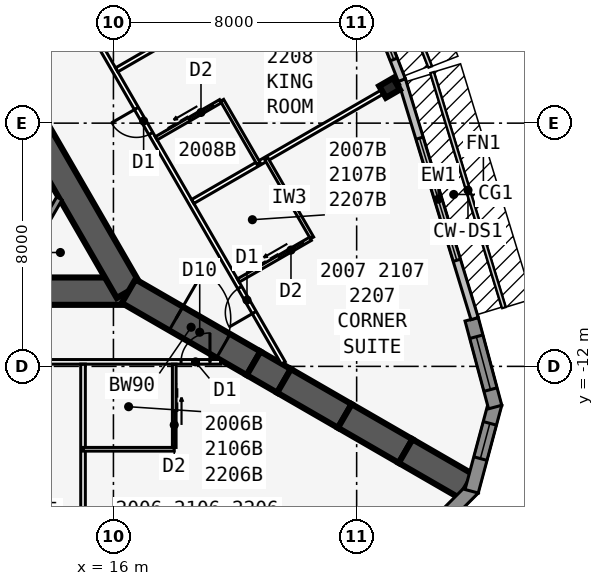
"""IFC4 building model, lengths in metres.
Left out: names, types, materials, properties, quantities, classifications, styles, units other than length and angle.
Written with IfcOpenShell. Run it as: python <this file> out.ifc"""

import sys

from ifc_helpers import new_model, si_unit, direction, frame, frame_2d, origin, origin_2d, place, context, subcontext, project, spatial, polyline, rectangle, i_section, outline, extrude, element, fill, save


model = new_model("IFC4")
c1 = context("Model", 3, precision=1e-05, world=origin(), true_north=direction((0.0, 1.0)))
c2 = subcontext(c1, "Body", "Model", "MODEL_VIEW")
j1 = project(units=[si_unit("LENGTHUNIT", "METRE"), si_unit("PLANEANGLEUNIT", "RADIAN")], contexts=[c1])
p1 = place(None, origin())
s1 = spatial("IfcSite", under=j1, at=p1, CompositionType="ELEMENT")
p2 = place(p1, origin())
s2 = spatial("IfcBuilding", under=s1, at=p2, CompositionType="ELEMENT")
p3 = place(p2, frame((0.0, 0.0, 79.5)))
s3 = spatial("IfcBuildingStorey", under=s2, at=p3, CompositionType="ELEMENT", Elevation=79.5)
p4 = place(p3, frame((-16.5, -9.526, 0.0), z_axis=(0.0, 0.0, 1.0), x_axis=(1.0, 0.0, 0.0)))
e1 = element("IfcWall", 1, at=p4, inside=s3, PredefinedType="SHEAR", context=c2, shape_type="SweptSolid", body=[
    extrude(rectangle(XDim=33.0, YDim=0.9, at=frame_2d((16.5, 0.0))), origin(), (0.0, 0.0, 1.0), 3.4),
])
p5 = place(p4, frame((14.05, 0.0, 0.0)))
e2 = element("IfcOpeningElement", 2, at=p5, cuts=e1, PredefinedType="OPENING", context=c2, shape_type="SweptSolid", body=[
    extrude(rectangle(XDim=1.8, YDim=2.13, at=frame_2d((0.9, 1.065))), frame((0.0, 0.46, 0.0), z_axis=(0.0, -1.0, 0.0), x_axis=(1.0, 0.0, 0.0)), (0.0, 0.0, 1.0), 0.92),
])
p6 = place(p3, frame((16.5, -9.526, 0.0), z_axis=(0.0, 0.0, 1.0), x_axis=(-0.499999749417, 0.866025548458, 0.0)))
e3 = element("IfcWall", 3, at=p6, inside=s3, PredefinedType="SHEAR", context=c2, shape_type="SweptSolid", body=[
    extrude(rectangle(XDim=33.0, YDim=0.9, at=frame_2d((16.5, 0.0))), origin(), (0.0, 0.0, 1.0), 3.4),
])
p7 = place(p6, frame((14.15, 0.0, 0.0)))
e4 = element("IfcOpeningElement", 4, at=p7, cuts=e3, PredefinedType="OPENING", context=c2, shape_type="SweptSolid", body=[
    extrude(rectangle(XDim=1.8, YDim=2.13, at=frame_2d((0.9, 1.065))), frame((0.0, 0.46, 0.0), z_axis=(0.0, -1.0, 0.0), x_axis=(1.0, 0.0, 0.0)), (0.0, 0.0, 1.0), 0.92),
])
p8 = place(p6, frame((12.6, 0.0, 0.0)))
e5 = element("IfcOpeningElement", 5, at=p8, cuts=e3, PredefinedType="OPENING", context=c2, shape_type="SweptSolid", body=[
    extrude(rectangle(XDim=1.0, YDim=2.13, at=frame_2d((0.5, 1.065))), frame((0.0, 0.46, 0.0), z_axis=(0.0, -1.0, 0.0), x_axis=(1.0, 0.0, 0.0)), (0.0, 0.0, 1.0), 0.92),
])
p9 = place(p3, frame((16.5, -9.526, 0.0), z_axis=(0.0, 0.0, 1.0), x_axis=(0.866031398331, -0.499989616998, 0.0)))
e6 = element("IfcWall", 6, at=p9, inside=s3, PredefinedType="SHEAR", context=c2, shape_type="SweptSolid", body=[
    extrude(rectangle(XDim=4.746, YDim=0.9, at=frame_2d((2.373, 0.0))), origin(), (0.0, 0.0, 1.0), 3.4),
])
p10 = place(p9, frame((1.8, 0.0, 0.0)))
e7 = element("IfcOpeningElement", 7, at=p10, cuts=e6, PredefinedType="OPENING", context=c2, shape_type="SweptSolid", body=[
    extrude(rectangle(XDim=1.8, YDim=2.13, at=frame_2d((0.9, 1.065))), frame((0.0, 0.46, 0.0), z_axis=(0.0, -1.0, 0.0), x_axis=(1.0, 0.0, 0.0)), (0.0, 0.0, 1.0), 0.92),
])
p11 = place(p3, frame((20.61, -11.899, 0.0), z_axis=(0.0, 0.0, 1.0), x_axis=(0.866009537788, -0.500027479704, 0.0)))
e8 = element("IfcWall", 8, at=p11, inside=s3, PredefinedType="SHEAR", context=c2, shape_type="SweptSolid", body=[
    extrude(rectangle(XDim=1.155, YDim=0.9, at=frame_2d((0.577, 0.0))), origin(), (0.0, 0.0, 1.0), 3.4),
])
for number, where, z_axis, x_axis in (
    (9, (21.61, -12.477, 0.0), (0.0, 0.0, 1.0), (0.866, -0.5, 0.0)),
    (10, (23.61, -13.631, 0.0), (0.0, 0.0, 1.0), (0.866, -0.5, 0.0)),
    (11, (25.61, -14.786, 0.0), (0.0, 0.0, 1.0), (0.866, -0.5, 0.0)),
):
    element("IfcWall", number, at=place(p3, frame(where, z_axis=z_axis, x_axis=x_axis)), inside=s3, PredefinedType="SHEAR", context=c2, shape_type="SweptSolid", body=[
        extrude(rectangle(XDim=2.309, YDim=0.9, at=frame_2d((1.155, 0.0))), origin(), (0.0, 0.0, 1.0), 3.4),
    ])
p12 = place(p3, frame((25.083, -2.839, 0.0), z_axis=(0.0, 0.0, 1.0), x_axis=(-0.5, 0.866025403784, 0.0)))
e12 = element("IfcColumn", 12, at=p12, inside=s3, PredefinedType="COLUMN", context=c2, shape_type="SweptSolid", body=[
    extrude(i_section(OverallWidth=0.442, OverallDepth=0.531, WebThickness=0.066, FlangeThickness=0.106, at=origin_2d()), origin(), (0.0, 0.0, 1.0), 3.4),
])
p13 = place(p3, frame((25.728, -18.12, 0.0), z_axis=(0.0, 0.0, 1.0), x_axis=(0.707025086683, 0.707188466253, 0.0)))
e13 = element("IfcWall", 13, at=p13, inside=s3, PredefinedType="SOLIDWALL", context=c2, shape_type="SweptSolid", body=[
    extrude(outline(polyline([(2.989, 0.225), (2.93, 0.225), (2.438, 0.093), (2.402, 0.225), (0.0, 0.225), (0.0, -0.225), (2.989, -0.225), (2.989, 0.225)])), origin(), (0.0, 0.0, 1.0), 3.235),
])
p14 = place(p13, frame((0.676, 0.0, 0.45)))
e14 = element("IfcOpeningElement", 14, at=p14, cuts=e13, PredefinedType="OPENING", context=c2, shape_type="SweptSolid", body=[
    extrude(rectangle(XDim=1.2, YDim=2.4, at=frame_2d((0.6, 1.2))), frame((0.0, 0.235, 0.0), z_axis=(0.0, -1.0, 0.0), x_axis=(1.0, 0.0, 0.0)), (0.0, 0.0, 1.0), 0.47),
])
p15 = place(p3, frame((27.783, -16.108, 0.0), z_axis=(0.0, 0.0, 1.0), x_axis=(0.258801419081, 0.965930548995, 0.0)))
e15 = element("IfcWall", 15, at=p15, inside=s3, PredefinedType="SOLIDWALL", context=c2, shape_type="SweptSolid", body=[
    extrude(outline(polyline([(2.989, 0.225), (0.586, 0.225), (0.551, 0.093), (0.06, 0.225), (0.0, 0.225), (0.0, -0.225), (2.989, -0.225), (2.989, 0.225)])), origin(), (0.0, 0.0, 1.0), 3.235),
])
p16 = place(p15, frame((1.113, 0.0, 0.45)))
e16 = element("IfcOpeningElement", 16, at=p16, cuts=e15, PredefinedType="OPENING", context=c2, shape_type="SweptSolid", body=[
    extrude(rectangle(XDim=1.2, YDim=2.4, at=frame_2d((0.6, 1.2))), frame((0.0, 0.235, 0.0), z_axis=(0.0, -1.0, 0.0), x_axis=(1.0, 0.0, 0.0)), (0.0, 0.0, 1.0), 0.47),
])
p17 = place(p3, frame((28.556, -13.337, 0.0), z_axis=(0.0, 0.0, 1.0), x_axis=(-0.258780998834, 0.965936019953, 0.0)))
e17 = element("IfcWall", 17, at=p17, inside=s3, PredefinedType="SOLIDWALL", context=c2, shape_type="SweptSolid", body=[
    extrude(rectangle(XDim=2.989, YDim=0.45, at=frame_2d((1.494, 0.0))), origin(), (0.0, 0.0, 1.0), 3.235),
])
p18 = place(p17, frame((0.594, 0.0, 0.45)))
e18 = element("IfcOpeningElement", 18, at=p18, cuts=e17, PredefinedType="OPENING", context=c2, shape_type="SweptSolid", body=[
    extrude(rectangle(XDim=1.8, YDim=2.4, at=frame_2d((0.9, 1.2))), frame((0.0, 0.235, 0.0), z_axis=(0.0, -1.0, 0.0), x_axis=(1.0, 0.0, 0.0)), (0.0, 0.0, 1.0), 0.47),
])
p19 = place(p3, frame((27.88, -10.429, 0.0), z_axis=(0.0, 0.0, 1.0), x_axis=(-0.2919790669, 0.956424709265, 0.0)))
e19 = element("IfcWall", 19, at=p19, inside=s3, PredefinedType="STANDARD", context=c2, shape_type="SweptSolid", body=[
    extrude(rectangle(XDim=8.211, YDim=0.25, at=frame_2d((4.105, 0.0))), origin(), (0.0, 0.0, 1.0), 3.235),
])
p20 = place(p19, frame((2.006, 0.0, 0.45)))
e20 = element("IfcOpeningElement", 20, at=p20, cuts=e19, PredefinedType="OPENING", context=c2, shape_type="SweptSolid", body=[
    extrude(rectangle(XDim=4.2, YDim=2.4, at=frame_2d((2.1, 1.2))), frame((0.0, 0.135, 0.0), z_axis=(0.0, -1.0, 0.0), x_axis=(1.0, 0.0, 0.0)), (0.0, 0.0, 1.0), 0.27),
])
p21 = place(p3, frame((25.486, -2.584, 0.0), z_axis=(0.0, 0.0, 1.0), x_axis=(-0.364013463868, 0.931393685894, 0.0)))
e21 = element("IfcWall", 21, at=p21, inside=s3, PredefinedType="STANDARD", context=c2, shape_type="SweptSolid", body=[
    extrude(rectangle(XDim=5.058, YDim=0.25, at=frame_2d((2.529, 0.0))), origin(), (0.0, 0.0, 1.0), 3.235),
])
p22 = place(p21, frame((0.729, 0.0, 0.45)))
e22 = element("IfcOpeningElement", 22, at=p22, cuts=e21, PredefinedType="OPENING", context=c2, shape_type="SweptSolid", body=[
    extrude(rectangle(XDim=3.6, YDim=2.4, at=frame_2d((1.8, 1.2))), frame((0.0, 0.135, 0.0), z_axis=(0.0, -1.0, 0.0), x_axis=(1.0, 0.0, 0.0)), (0.0, 0.0, 1.0), 0.27),
])
p23 = place(p3, frame((-19.527, -11.851, 0.0), z_axis=(0.0, 0.0, 1.0), x_axis=(1.0, 0.0, 0.0)))
e23 = element("IfcWall", 23, at=p23, inside=s3, PredefinedType="PARTITIONING", context=c2, shape_type="SweptSolid", body=[
    extrude(rectangle(XDim=39.054, YDim=0.15, at=frame_2d((19.527, 0.0))), origin(), (0.0, 0.0, 1.0), 3.235),
])
p24 = place(p23, frame((0.352, 0.0, 0.0)))
e24 = element("IfcOpeningElement", 24, at=p24, cuts=e23, PredefinedType="OPENING", context=c2, shape_type="SweptSolid", body=[
    extrude(rectangle(XDim=0.95, YDim=2.13, at=frame_2d((0.475, 1.065))), frame((0.0, 0.085, 0.0), z_axis=(0.0, -1.0, 0.0), x_axis=(1.0, 0.0, 0.0)), (0.0, 0.0, 1.0), 0.17),
])
p25 = place(p23, frame((7.752, 0.0, 0.0)))
e25 = element("IfcOpeningElement", 25, at=p25, cuts=e23, PredefinedType="OPENING", context=c2, shape_type="SweptSolid", body=[
    extrude(rectangle(XDim=0.95, YDim=2.13, at=frame_2d((0.475, 1.065))), frame((0.0, 0.085, 0.0), z_axis=(0.0, -1.0, 0.0), x_axis=(1.0, 0.0, 0.0)), (0.0, 0.0, 1.0), 0.17),
])
p26 = place(p23, frame((17.752, 0.0, 0.0)))
e26 = element("IfcOpeningElement", 26, at=p26, cuts=e23, PredefinedType="OPENING", context=c2, shape_type="SweptSolid", body=[
    extrude(rectangle(XDim=0.95, YDim=2.13, at=frame_2d((0.475, 1.065))), frame((0.0, 0.085, 0.0), z_axis=(0.0, -1.0, 0.0), x_axis=(1.0, 0.0, 0.0)), (0.0, 0.0, 1.0), 0.17),
])
p27 = place(p23, frame((21.527, 0.0, 0.0)))
e27 = element("IfcOpeningElement", 27, at=p27, cuts=e23, PredefinedType="OPENING", context=c2, shape_type="SweptSolid", body=[
    extrude(rectangle(XDim=1.0, YDim=2.13, at=frame_2d((0.5, 1.065))), frame((0.0, 0.085, 0.0), z_axis=(0.0, -1.0, 0.0), x_axis=(1.0, 0.0, 0.0)), (0.0, 0.0, 1.0), 0.17),
])
p28 = place(p23, frame((27.152, 0.0, 0.0)))
e28 = element("IfcOpeningElement", 28, at=p28, cuts=e23, PredefinedType="OPENING", context=c2, shape_type="SweptSolid", body=[
    extrude(rectangle(XDim=0.95, YDim=2.13, at=frame_2d((0.475, 1.065))), frame((0.0, 0.085, 0.0), z_axis=(0.0, -1.0, 0.0), x_axis=(1.0, 0.0, 0.0)), (0.0, 0.0, 1.0), 0.17),
])
p29 = place(p23, frame((32.152, 0.0, 0.0)))
e29 = element("IfcOpeningElement", 29, at=p29, cuts=e23, PredefinedType="OPENING", context=c2, shape_type="SweptSolid", body=[
    extrude(rectangle(XDim=0.95, YDim=2.13, at=frame_2d((0.475, 1.065))), frame((0.0, 0.085, 0.0), z_axis=(0.0, -1.0, 0.0), x_axis=(1.0, 0.0, 0.0)), (0.0, 0.0, 1.0), 0.17),
])
p30 = place(p23, frame((37.752, 0.0, 0.0)))
e30 = element("IfcOpeningElement", 30, at=p30, cuts=e23, PredefinedType="OPENING", context=c2, shape_type="SweptSolid", body=[
    extrude(rectangle(XDim=0.95, YDim=2.13, at=frame_2d((0.475, 1.065))), frame((0.0, 0.085, 0.0), z_axis=(0.0, -1.0, 0.0), x_axis=(1.0, 0.0, 0.0)), (0.0, 0.0, 1.0), 0.17),
])
p31 = place(p3, frame((15.0, -11.926, 0.0), z_axis=(0.0, 0.0, 1.0), x_axis=(0.0, -1.0, 0.0)))
e31 = element("IfcWall", 31, at=p31, inside=s3, PredefinedType="PARTITIONING", context=c2, shape_type="SweptSolid", body=[
    extrude(rectangle(XDim=8.72, YDim=0.15, at=frame_2d((4.36, 0.0))), origin(), (0.0, 0.0, 1.0), 2.389),
])
p32 = place(p3, frame((15.0, -14.726, 0.0), z_axis=(0.0, 0.0, 1.0), x_axis=(1.0, 0.0, 0.0)))
e32 = element("IfcWall", 32, at=p32, inside=s3, PredefinedType="PLUMBINGWALL", context=c2, shape_type="SweptSolid", body=[
    extrude(rectangle(XDim=3.0, YDim=0.12, at=frame_2d((1.5, 0.0))), origin(), (0.0, 0.0, 1.0), 3.235),
])
p33 = place(p3, frame((18.0, -11.926, 0.0), z_axis=(0.0, 0.0, 1.0), x_axis=(0.0, -1.0, 0.0)))
e33 = element("IfcWall", 33, at=p33, inside=s3, PredefinedType="PLUMBINGWALL", context=c2, shape_type="SweptSolid", body=[
    extrude(rectangle(XDim=2.74, YDim=0.12, at=frame_2d((1.37, 0.0))), origin(), (0.0, 0.0, 1.0), 3.235),
])
p34 = place(p33, frame((1.55, 0.0, 0.0)))
e34 = element("IfcOpeningElement", 34, at=p34, cuts=e33, PredefinedType="OPENING", context=c2, shape_type="SweptSolid", body=[
    extrude(rectangle(XDim=0.9, YDim=2.13, at=frame_2d((0.45, 1.065))), frame((0.0, 0.07, 0.0), z_axis=(0.0, -1.0, 0.0), x_axis=(1.0, 0.0, 0.0)), (0.0, 0.0, 1.0), 0.14),
])
p35 = place(p3, frame((21.586, -11.885, 0.0), z_axis=(0.0, 0.0, 1.0), x_axis=(-0.500001915564, 0.86602429783, 0.0)))
e35 = element("IfcWall", 35, at=p35, inside=s3, PredefinedType="PARTITIONING", context=c2, shape_type="SweptSolid", body=[
    extrude(rectangle(XDim=42.172, YDim=0.15, at=frame_2d((21.086, 0.0))), origin(), (0.0, 0.0, 1.0), 3.235),
])
p36 = place(p35, frame((1.911, 0.0, 0.0)))
e36 = element("IfcOpeningElement", 36, at=p36, cuts=e35, PredefinedType="OPENING", context=c2, shape_type="SweptSolid", body=[
    extrude(rectangle(XDim=0.95, YDim=2.13, at=frame_2d((0.475, 1.065))), frame((0.0, 0.085, 0.0), z_axis=(0.0, -1.0, 0.0), x_axis=(1.0, 0.0, 0.0)), (0.0, 0.0, 1.0), 0.17),
])
p37 = place(p35, frame((8.711, 0.0, 0.0)))
e37 = element("IfcOpeningElement", 37, at=p37, cuts=e35, PredefinedType="OPENING", context=c2, shape_type="SweptSolid", body=[
    extrude(rectangle(XDim=0.95, YDim=2.13, at=frame_2d((0.475, 1.065))), frame((0.0, 0.085, 0.0), z_axis=(0.0, -1.0, 0.0), x_axis=(1.0, 0.0, 0.0)), (0.0, 0.0, 1.0), 0.17),
])
p38 = place(p35, frame((13.111, 0.0, 0.0)))
e38 = element("IfcOpeningElement", 38, at=p38, cuts=e35, PredefinedType="OPENING", context=c2, shape_type="SweptSolid", body=[
    extrude(rectangle(XDim=0.95, YDim=2.13, at=frame_2d((0.475, 1.065))), frame((0.0, 0.085, 0.0), z_axis=(0.0, -1.0, 0.0), x_axis=(1.0, 0.0, 0.0)), (0.0, 0.0, 1.0), 0.17),
])
p39 = place(p35, frame((23.711, 0.0, 0.0)))
e39 = element("IfcOpeningElement", 39, at=p39, cuts=e35, PredefinedType="OPENING", context=c2, shape_type="SweptSolid", body=[
    extrude(rectangle(XDim=0.95, YDim=2.13, at=frame_2d((0.475, 1.065))), frame((0.0, 0.085, 0.0), z_axis=(0.0, -1.0, 0.0), x_axis=(1.0, 0.0, 0.0)), (0.0, 0.0, 1.0), 0.17),
])
p40 = place(p35, frame((29.311, 0.0, 0.0)))
e40 = element("IfcOpeningElement", 40, at=p40, cuts=e35, PredefinedType="OPENING", context=c2, shape_type="SweptSolid", body=[
    extrude(rectangle(XDim=0.95, YDim=2.13, at=frame_2d((0.475, 1.065))), frame((0.0, 0.085, 0.0), z_axis=(0.0, -1.0, 0.0), x_axis=(1.0, 0.0, 0.0)), (0.0, 0.0, 1.0), 0.17),
])
p41 = place(p35, frame((39.311, 0.0, 0.0)))
e41 = element("IfcOpeningElement", 41, at=p41, cuts=e35, PredefinedType="OPENING", context=c2, shape_type="SweptSolid", body=[
    extrude(rectangle(XDim=0.95, YDim=2.13, at=frame_2d((0.475, 1.065))), frame((0.0, 0.085, 0.0), z_axis=(0.0, -1.0, 0.0), x_axis=(1.0, 0.0, 0.0)), (0.0, 0.0, 1.0), 0.17),
])
p42 = place(p3, frame((18.608, -6.577, 0.0), z_axis=(0.0, 0.0, 1.0), x_axis=(0.866034818847, 0.499983692279, 0.0)))
e42 = element("IfcWall", 42, at=p42, inside=s3, PredefinedType="PARTITIONING", context=c2, shape_type="SweptSolid", body=[
    extrude(rectangle(XDim=7.82, YDim=0.15, at=frame_2d((3.91, 0.0))), origin(), (0.0, 0.0, 1.0), 2.389),
])
p43 = place(p3, frame((16.108, -2.247, 0.0), z_axis=(0.0, 0.0, 1.0), x_axis=(0.866018881988, 0.500011295912, 0.0)))
e43 = element("IfcWall", 43, at=p43, inside=s3, PredefinedType="PARTITIONING", context=c2, shape_type="SweptSolid", body=[
    extrude(rectangle(XDim=8.585, YDim=0.15, at=frame_2d((4.292, 0.0))), origin(), (0.0, 0.0, 1.0), 2.389),
])
p44 = place(p3, frame((22.533, -7.775, 0.0), z_axis=(0.0, 0.0, 1.0), x_axis=(-0.499990139034, 0.866031096941, 0.0)))
e44 = element("IfcWall", 44, at=p44, inside=s3, PredefinedType="PLUMBINGWALL", context=c2, shape_type="SweptSolid", body=[
    extrude(rectangle(XDim=3.0, YDim=0.12, at=frame_2d((1.5, 0.0))), origin(), (0.0, 0.0, 1.0), 3.235),
])
p45 = place(p3, frame((20.108, -9.175, 0.0), z_axis=(0.0, 0.0, 1.0), x_axis=(0.866035715982, 0.499982138324, 0.0)))
e45 = element("IfcWall", 45, at=p45, inside=s3, PredefinedType="PLUMBINGWALL", context=c2, shape_type="SweptSolid", body=[
    extrude(rectangle(XDim=2.74, YDim=0.12, at=frame_2d((1.37, 0.0))), origin(), (0.0, 0.0, 1.0), 3.235),
])
p46 = place(p45, frame((1.55, 0.0, 0.0)))
e46 = element("IfcOpeningElement", 46, at=p46, cuts=e45, PredefinedType="OPENING", context=c2, shape_type="SweptSolid", body=[
    extrude(rectangle(XDim=0.9, YDim=2.13, at=frame_2d((0.45, 1.065))), frame((0.0, 0.07, 0.0), z_axis=(0.0, -1.0, 0.0), x_axis=(1.0, 0.0, 0.0)), (0.0, 0.0, 1.0), 0.14),
])
p47 = place(p3, frame((20.773, -5.327, 0.0), z_axis=(0.0, 0.0, 1.0), x_axis=(-0.500001309137, 0.866024647952, 0.0)))
e47 = element("IfcWall", 47, at=p47, inside=s3, PredefinedType="PLUMBINGWALL", context=c2, shape_type="SweptSolid", body=[
    extrude(rectangle(XDim=2.4, YDim=0.12, at=frame_2d((1.2, 0.0))), origin(), (0.0, 0.0, 1.0), 3.235),
])
p48 = place(p3, frame((17.408, -4.499, 0.0), z_axis=(0.0, 0.0, 1.0), x_axis=(0.866023955769, 0.500002508028, 0.0)))
e48 = element("IfcWall", 48, at=p48, inside=s3, PredefinedType="PLUMBINGWALL", context=c2, shape_type="SweptSolid", body=[
    extrude(rectangle(XDim=2.44, YDim=0.12, at=frame_2d((1.22, 0.0))), origin(), (0.0, 0.0, 1.0), 3.235),
])
p49 = place(p48, frame((1.25, 0.0, 0.0)))
e49 = element("IfcOpeningElement", 49, at=p49, cuts=e48, PredefinedType="OPENING", context=c2, shape_type="SweptSolid", body=[
    extrude(rectangle(XDim=0.9, YDim=2.13, at=frame_2d((0.45, 1.065))), frame((0.0, 0.07, 0.0), z_axis=(0.0, -1.0, 0.0), x_axis=(1.0, 0.0, 0.0)), (0.0, 0.0, 1.0), 0.14),
])
p50 = place(p3, frame((14.219, -6.476, 0.0), z_axis=(0.0, 0.0, 1.0), x_axis=(-0.499952404951, -0.866052881055, 0.0)))
e50 = element("IfcWall", 50, at=p50, inside=s3, PredefinedType="SOLIDWALL", context=c2, shape_type="SweptSolid", body=[
    extrude(rectangle(XDim=3.002, YDim=0.2, at=frame_2d((1.501, 0.0))), origin(), (0.0, 0.0, 1.0), 3.235),
])
p51 = place(p16, origin())
e51 = element("IfcWindow", 51, at=p51, inside=s3, PartitioningType="SINGLE_PANEL", PredefinedType="WINDOW", context=c2, shape_type="SweptSolid", body=[
    extrude(rectangle(XDim=1.2, YDim=2.4, at=frame_2d((0.6, 1.2))), frame((0.0, 0.03, 0.0), z_axis=(0.0, -1.0, 0.0), x_axis=(1.0, 0.0, 0.0)), (0.0, 0.0, 1.0), 0.06),
])
fill(e16, e51)
p52 = place(p18, origin())
e52 = element("IfcWindow", 52, at=p52, inside=s3, PartitioningType="SINGLE_PANEL", PredefinedType="WINDOW", context=c2, shape_type="SweptSolid", body=[
    extrude(rectangle(XDim=1.8, YDim=2.4, at=frame_2d((0.9, 1.2))), frame((0.0, 0.03, 0.0), z_axis=(0.0, -1.0, 0.0), x_axis=(1.0, 0.0, 0.0)), (0.0, 0.0, 1.0), 0.06),
])
fill(e18, e52)
p53 = place(p20, origin())
e53 = element("IfcWindow", 53, at=p53, inside=s3, PartitioningType="SINGLE_PANEL", PredefinedType="WINDOW", context=c2, shape_type="SweptSolid", body=[
    extrude(rectangle(XDim=4.2, YDim=2.4, at=frame_2d((2.1, 1.2))), frame((0.0, 0.03, 0.0), z_axis=(0.0, -1.0, 0.0), x_axis=(1.0, 0.0, 0.0)), (0.0, 0.0, 1.0), 0.06),
])
fill(e20, e53)
p54 = place(p22, origin())
e54 = element("IfcWindow", 54, at=p54, inside=s3, PartitioningType="SINGLE_PANEL", PredefinedType="WINDOW", context=c2, shape_type="SweptSolid", body=[
    extrude(rectangle(XDim=3.6, YDim=2.4, at=frame_2d((1.8, 1.2))), frame((0.0, 0.03, 0.0), z_axis=(0.0, -1.0, 0.0), x_axis=(1.0, 0.0, 0.0)), (0.0, 0.0, 1.0), 0.06),
])
fill(e22, e54)
p55 = place(p34, origin())
e55 = element("IfcDoor", 55, at=p55, inside=s3, OperationType="SLIDING_TO_LEFT", PredefinedType="DOOR", context=c2, shape_type="SweptSolid", body=[
    extrude(rectangle(XDim=0.9, YDim=2.13, at=frame_2d((0.45, 1.065))), frame((0.0, 0.025, 0.0), z_axis=(0.0, -1.0, 0.0), x_axis=(1.0, 0.0, 0.0)), (0.0, 0.0, 1.0), 0.05),
])
fill(e34, e55)
p56 = place(p30, origin())
e56 = element("IfcDoor", 56, at=p56, inside=s3, OperationType="SINGLE_SWING_RIGHT", PredefinedType="DOOR", context=c2, shape_type="SweptSolid", body=[
    extrude(rectangle(XDim=0.95, YDim=2.13, at=frame_2d((0.475, 1.065))), frame((0.0, 0.025, 0.0), z_axis=(0.0, -1.0, 0.0), x_axis=(1.0, 0.0, 0.0)), (0.0, 0.0, 1.0), 0.05),
])
fill(e30, e56)
p57 = place(p46, origin())
e57 = element("IfcDoor", 57, at=p57, inside=s3, OperationType="SLIDING_TO_LEFT", PredefinedType="DOOR", context=c2, shape_type="SweptSolid", body=[
    extrude(rectangle(XDim=0.9, YDim=2.13, at=frame_2d((0.45, 1.065))), frame((0.0, 0.025, 0.0), z_axis=(0.0, -1.0, 0.0), x_axis=(1.0, 0.0, 0.0)), (0.0, 0.0, 1.0), 0.05),
])
fill(e46, e57)
p58 = place(p36, origin())
e58 = element("IfcDoor", 58, at=p58, inside=s3, OperationType="SINGLE_SWING_LEFT", PredefinedType="DOOR", context=c2, shape_type="SweptSolid", body=[
    extrude(rectangle(XDim=0.95, YDim=2.13, at=frame_2d((0.475, 1.065))), frame((0.0, 0.025, 0.0), z_axis=(0.0, -1.0, 0.0), x_axis=(1.0, 0.0, 0.0)), (0.0, 0.0, 1.0), 0.05),
])
fill(e36, e58)
p59 = place(p49, origin())
e59 = element("IfcDoor", 59, at=p59, inside=s3, OperationType="SLIDING_TO_LEFT", PredefinedType="DOOR", context=c2, shape_type="SweptSolid", body=[
    extrude(rectangle(XDim=0.9, YDim=2.13, at=frame_2d((0.45, 1.065))), frame((0.0, 0.025, 0.0), z_axis=(0.0, -1.0, 0.0), x_axis=(1.0, 0.0, 0.0)), (0.0, 0.0, 1.0), 0.05),
])
fill(e49, e59)
p60 = place(p37, origin())
e60 = element("IfcDoor", 60, at=p60, inside=s3, OperationType="SINGLE_SWING_RIGHT", PredefinedType="DOOR", context=c2, shape_type="SweptSolid", body=[
    extrude(rectangle(XDim=0.95, YDim=2.13, at=frame_2d((0.475, 1.065))), frame((0.0, 0.025, 0.0), z_axis=(0.0, -1.0, 0.0), x_axis=(1.0, 0.0, 0.0)), (0.0, 0.0, 1.0), 0.05),
])
fill(e37, e60)
p61 = place(p10, origin())
e61 = element("IfcDoor", 61, at=p61, inside=s3, OperationType="DOUBLE_DOOR_DOUBLE_SWING", PredefinedType="DOOR", context=c2, shape_type="SweptSolid", body=[
    extrude(rectangle(XDim=1.8, YDim=2.13, at=frame_2d((0.9, 1.065))), frame((0.0, 0.025, 0.0), z_axis=(0.0, -1.0, 0.0), x_axis=(1.0, 0.0, 0.0)), (0.0, 0.0, 1.0), 0.05),
])
fill(e7, e61)
save(model, sys.argv[1])
